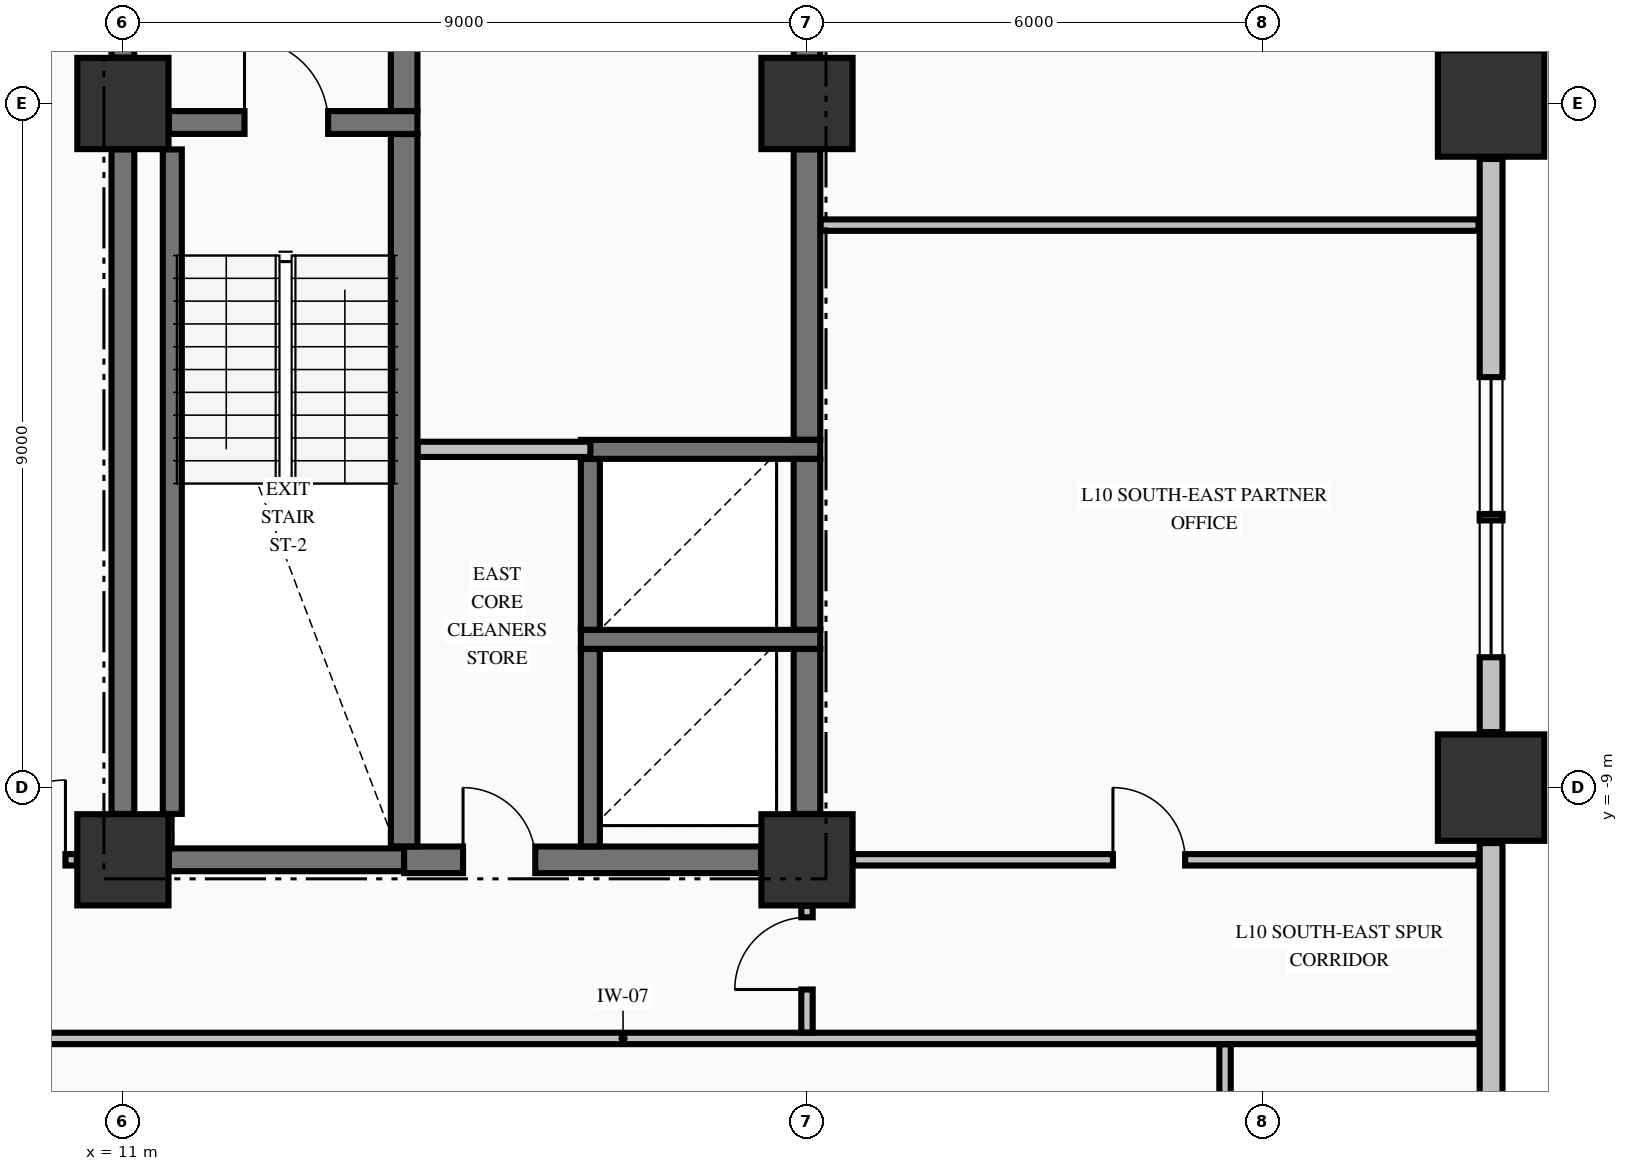
"""IFC4 building model, lengths in metres.
Left out: names, types, materials, properties, quantities, classifications, styles, units other than length and angle.
Written with IfcOpenShell. Run it as: python <this file> out.ifc"""

import sys

from ifc_helpers import new_model, si_unit, direction, frame, frame_2d, origin, origin_2d, place, context, subcontext, project, spatial, rectangle, extrude, element, fill, save


model = new_model("IFC4")
c1 = context("Model", 3, precision=1e-05, world=origin(), true_north=direction((0.0, 1.0)))
c2 = subcontext(c1, "Body", "Model", "MODEL_VIEW")
j1 = project(units=[si_unit("LENGTHUNIT", "METRE"), si_unit("PLANEANGLEUNIT", "RADIAN")], contexts=[c1])
p1 = place(None, origin())
s1 = spatial("IfcSite", under=j1, at=p1, CompositionType="ELEMENT")
p2 = place(p1, origin())
s2 = spatial("IfcBuilding", under=s1, at=p2, CompositionType="ELEMENT")
p3 = place(p2, frame((0.0, 0.0, 45.05)))
s3 = spatial("IfcBuildingStorey", under=s2, at=p3, CompositionType="ELEMENT", Elevation=45.05)
for number, where, z_axis, x_axis in (
    (1, (29.0, -9.0, -0.25), (0.0, 0.0, 1.0), (1.0, 0.0, 0.0)),
    (2, (29.0, 0.0, -0.25), (0.0, 0.0, 1.0), (1.0, 0.0, 0.0)),
):
    element("IfcColumn", number, at=place(p3, frame(where, z_axis=z_axis, x_axis=x_axis)), inside=s3, PredefinedType="COLUMN", context=c2, shape_type="SweptSolid", body=[
        extrude(rectangle(XDim=1.4, YDim=1.4, at=origin_2d()), origin(), (0.0, 0.0, 1.0), 3.57),
    ])
for number, where, z_axis, x_axis in (
    (3, (11.0, -9.95, -0.25), (0.0, 0.0, 1.0), (1.0, 0.0, 0.0)),
    (4, (11.0, 0.0, -0.25), (0.0, 0.0, 1.0), (1.0, 0.0, 0.0)),
    (5, (20.0, -9.95, -0.25), (0.0, 0.0, 1.0), (1.0, 0.0, 0.0)),
    (6, (20.0, 0.0, -0.25), (0.0, 0.0, 1.0), (1.0, 0.0, 0.0)),
):
    element("IfcColumn", number, at=place(p3, frame(where, z_axis=z_axis, x_axis=x_axis)), inside=s3, PredefinedType="COLUMN", context=c2, shape_type="SweptSolid", body=[
        extrude(rectangle(XDim=1.2, YDim=1.2, at=origin_2d()), origin(), (0.0, 0.0, 1.0), 3.57),
    ])
p4 = place(p3, frame((29.0, -22.27, 0.0), z_axis=(0.0, 0.0, 1.0), x_axis=(0.0, 1.0, 0.0)))
e7 = element("IfcWall", 7, at=p4, inside=s3, PredefinedType="STANDARD", context=c2, shape_type="SweptSolid", body=[
    extrude(rectangle(XDim=12.54, YDim=0.3, at=frame_2d((6.27, 0.0))), origin(), (0.0, 0.0, 1.0), 2.712),
])
p5 = place(p3, frame((29.0, -8.27, 0.0), z_axis=(0.0, 0.0, 1.0), x_axis=(0.0, 1.0, 0.0)))
e8 = element("IfcWall", 8, at=p5, inside=s3, PredefinedType="STANDARD", context=c2, shape_type="SweptSolid", body=[
    extrude(rectangle(XDim=7.54, YDim=0.3, at=frame_2d((3.77, 0.0))), origin(), (0.0, 0.0, 1.0), 2.712),
])
p6 = place(p5, frame((0.985, 0.0, 0.78)))
e9 = element("IfcOpeningElement", 9, at=p6, cuts=e8, PredefinedType="OPENING", context=c2, shape_type="SweptSolid", body=[
    extrude(rectangle(XDim=1.8, YDim=1.72, at=frame_2d((0.9, 0.86))), frame((0.0, 0.16, 0.0), z_axis=(0.0, -1.0, 0.0), x_axis=(1.0, 0.0, 0.0)), (0.0, 0.0, 1.0), 0.32),
])
p7 = place(p5, frame((2.87, 0.0, 0.78)))
e10 = element("IfcOpeningElement", 10, at=p7, cuts=e8, PredefinedType="OPENING", context=c2, shape_type="SweptSolid", body=[
    extrude(rectangle(XDim=1.8, YDim=1.72, at=frame_2d((0.9, 0.86))), frame((0.0, 0.16, 0.0), z_axis=(0.0, -1.0, 0.0), x_axis=(1.0, 0.0, 0.0)), (0.0, 0.0, 1.0), 0.32),
])
p8 = place(p3, frame((11.604, -9.95, 0.0), z_axis=(0.0, 0.0, 1.0), x_axis=(1.0, 0.0, 0.0)))
e11 = element("IfcWall", 11, at=p8, inside=s3, PredefinedType="SHEAR", context=c2, shape_type="SweptSolid", body=[
    extrude(rectangle(XDim=3.096, YDim=0.3, at=frame_2d((1.548, 0.0))), origin(), (0.0, 0.0, 1.0), 3.32),
])
p9 = place(p3, frame((14.7, -9.95, 0.0), z_axis=(0.0, 0.0, 1.0), x_axis=(1.0, 0.0, 0.0)))
e12 = element("IfcWall", 12, at=p9, inside=s3, PredefinedType="SHEAR", context=c2, shape_type="SweptSolid", body=[
    extrude(rectangle(XDim=4.696, YDim=0.35, at=frame_2d((2.348, 0.0))), origin(), (0.0, 0.0, 1.0), 3.32),
])
p10 = place(p9, frame((0.775, 0.0, 0.0)))
e13 = element("IfcOpeningElement", 13, at=p10, cuts=e12, PredefinedType="OPENING", context=c2, shape_type="SweptSolid", body=[
    extrude(rectangle(XDim=0.95, YDim=2.15, at=frame_2d((0.475, 1.075))), frame((0.0, 0.185, 0.0), z_axis=(0.0, -1.0, 0.0), x_axis=(1.0, 0.0, 0.0)), (0.0, 0.0, 1.0), 0.37),
])
for number, where, z_axis, x_axis in (
    (14, (17.025, -7.05, 0.0), (0.0, 0.0, 1.0), (1.0, 0.0, 0.0)),
    (15, (17.025, -4.55, 0.0), (0.0, 0.0, 1.0), (1.0, 0.0, 0.0)),
):
    element("IfcWall", number, at=place(p3, frame(where, z_axis=z_axis, x_axis=x_axis)), inside=s3, PredefinedType="SOLIDWALL", context=c2, shape_type="SweptSolid", body=[
        extrude(rectangle(XDim=3.15, YDim=0.25, at=frame_2d((1.575, 0.0))), origin(), (0.0, 0.0, 1.0), 3.32),
    ])
p11 = place(p3, frame((11.604, -0.25, 0.0), z_axis=(0.0, 0.0, 1.0), x_axis=(1.0, 0.0, 0.0)))
e16 = element("IfcWall", 16, at=p11, inside=s3, PredefinedType="SHEAR", context=c2, shape_type="SweptSolid", body=[
    extrude(rectangle(XDim=3.271, YDim=0.3, at=frame_2d((1.635, 0.0))), origin(), (0.0, 0.0, 1.0), 3.32),
])
p12 = place(p11, frame((0.996, 0.0, 0.0)))
e17 = element("IfcOpeningElement", 17, at=p12, cuts=e16, PredefinedType="OPENING", context=c2, shape_type="SweptSolid", body=[
    extrude(rectangle(XDim=1.1, YDim=2.15, at=frame_2d((0.55, 1.075))), frame((0.0, 0.16, 0.0), z_axis=(0.0, -1.0, 0.0), x_axis=(1.0, 0.0, 0.0)), (0.0, 0.0, 1.0), 0.32),
])
p13 = place(p3, frame((-23.835, -12.3, 0.0), z_axis=(0.0, 0.0, 1.0), x_axis=(1.0, 0.0, 0.0)))
e18 = element("IfcWall", 18, at=p13, inside=s3, PredefinedType="PARTITIONING", context=c2, shape_type="SweptSolid", body=[
    extrude(rectangle(XDim=52.67, YDim=0.15, at=frame_2d((26.335, 0.0))), origin(), (0.0, 0.0, 1.0), 3.32),
])
p14 = place(p13, frame((8.99, 0.0, 0.0)))
e19 = element("IfcOpeningElement", 19, at=p14, cuts=e18, PredefinedType="OPENING", context=c2, shape_type="SweptSolid", body=[
    extrude(rectangle(XDim=1.05, YDim=2.15, at=frame_2d((0.525, 1.075))), frame((0.0, 0.085, 0.0), z_axis=(0.0, -1.0, 0.0), x_axis=(1.0, 0.0, 0.0)), (0.0, 0.0, 1.0), 0.17),
])
p15 = place(p13, frame((20.96, 0.0, 0.0)))
e20 = element("IfcOpeningElement", 20, at=p15, cuts=e18, PredefinedType="OPENING", context=c2, shape_type="SweptSolid", body=[
    extrude(rectangle(XDim=1.05, YDim=2.15, at=frame_2d((0.525, 1.075))), frame((0.0, 0.085, 0.0), z_axis=(0.0, -1.0, 0.0), x_axis=(1.0, 0.0, 0.0)), (0.0, 0.0, 1.0), 0.17),
])
p16 = place(p13, frame((29.11, 0.0, 0.0)))
e21 = element("IfcOpeningElement", 21, at=p16, cuts=e18, PredefinedType="OPENING", context=c2, shape_type="SweptSolid", body=[
    extrude(rectangle(XDim=1.05, YDim=2.15, at=frame_2d((0.525, 1.075))), frame((0.0, 0.085, 0.0), z_axis=(0.0, -1.0, 0.0), x_axis=(1.0, 0.0, 0.0)), (0.0, 0.0, 1.0), 0.17),
])
p17 = place(p3, frame((-10.394, -9.95, 0.0), z_axis=(0.0, 0.0, 1.0), x_axis=(1.0, 0.0, 0.0)))
e22 = element("IfcWall", 22, at=p17, inside=s3, PredefinedType="PARTITIONING", context=c2, shape_type="SweptSolid", body=[
    extrude(rectangle(XDim=20.788, YDim=0.15, at=frame_2d((10.394, 0.0))), origin(), (0.0, 0.0, 1.0), 3.32),
])
p18 = place(p17, frame((0.15, 0.0, 0.0)))
e23 = element("IfcOpeningElement", 23, at=p18, cuts=e22, PredefinedType="OPENING", context=c2, shape_type="SweptSolid", body=[
    extrude(rectangle(XDim=1.05, YDim=2.15, at=frame_2d((0.525, 1.075))), frame((0.0, 0.085, 0.0), z_axis=(0.0, -1.0, 0.0), x_axis=(1.0, 0.0, 0.0)), (0.0, 0.0, 1.0), 0.17),
])
p19 = place(p17, frame((19.588, 0.0, 0.0)))
e24 = element("IfcOpeningElement", 24, at=p19, cuts=e22, PredefinedType="OPENING", context=c2, shape_type="SweptSolid", body=[
    extrude(rectangle(XDim=1.05, YDim=2.15, at=frame_2d((0.525, 1.075))), frame((0.0, 0.085, 0.0), z_axis=(0.0, -1.0, 0.0), x_axis=(1.0, 0.0, 0.0)), (0.0, 0.0, 1.0), 0.17),
])
p20 = place(p17, frame((12.669, 0.0, 0.0)))
e25 = element("IfcOpeningElement", 25, at=p20, cuts=e22, PredefinedType="OPENING", context=c2, shape_type="SweptSolid", body=[
    extrude(rectangle(XDim=0.95, YDim=2.15, at=frame_2d((0.475, 1.075))), frame((0.0, 0.085, 0.0), z_axis=(0.0, -1.0, 0.0), x_axis=(1.0, 0.0, 0.0)), (0.0, 0.0, 1.0), 0.17),
])
p21 = place(p3, frame((20.606, -9.95, 0.0), z_axis=(0.0, 0.0, 1.0), x_axis=(1.0, 0.0, 0.0)))
e26 = element("IfcWall", 26, at=p21, inside=s3, PredefinedType="PARTITIONING", context=c2, shape_type="SweptSolid", body=[
    extrude(rectangle(XDim=8.229, YDim=0.15, at=frame_2d((4.115, 0.0))), origin(), (0.0, 0.0, 1.0), 3.32),
])
p22 = place(p21, frame((3.419, 0.0, 0.0)))
e27 = element("IfcOpeningElement", 27, at=p22, cuts=e26, PredefinedType="OPENING", context=c2, shape_type="SweptSolid", body=[
    extrude(rectangle(XDim=0.95, YDim=2.15, at=frame_2d((0.475, 1.075))), frame((0.0, 0.085, 0.0), z_axis=(0.0, -1.0, 0.0), x_axis=(1.0, 0.0, 0.0)), (0.0, 0.0, 1.0), 0.17),
])
p23 = place(p3, frame((14.878, -4.55, 0.0), z_axis=(0.0, 0.0, 1.0), x_axis=(1.0, 0.0, 0.0)))
e28 = element("IfcWall", 28, at=p23, inside=s3, PredefinedType="PARTITIONING", context=c2, shape_type="SweptSolid", body=[
    extrude(rectangle(XDim=2.272, YDim=0.2, at=frame_2d((1.136, 0.0))), origin(), (0.0, 0.0, 1.0), 3.32),
])
p24 = place(p3, frame((20.178, -1.6, 0.0), z_axis=(0.0, 0.0, 1.0), x_axis=(1.0, 0.0, 0.0)))
e29 = element("IfcWall", 29, at=p24, inside=s3, PredefinedType="PARTITIONING", context=c2, shape_type="SweptSolid", body=[
    extrude(rectangle(XDim=8.657, YDim=0.15, at=frame_2d((4.329, 0.0))), origin(), (0.0, 0.0, 1.0), 3.32),
])
p25 = place(p3, frame((11.0, -9.346, 0.0), z_axis=(0.0, 0.0, 1.0), x_axis=(0.0, 1.0, 0.0)))
e30 = element("IfcWall", 30, at=p25, inside=s3, PredefinedType="SHEAR", context=c2, shape_type="SweptSolid", body=[
    extrude(rectangle(XDim=8.742, YDim=0.3, at=frame_2d((4.371, 0.0))), origin(), (0.0, 0.0, 1.0), 3.32),
])
p26 = place(p3, frame((11.0, 0.604, 0.0), z_axis=(0.0, 0.0, 1.0), x_axis=(0.0, 1.0, 0.0)))
e31 = element("IfcWall", 31, at=p26, inside=s3, PredefinedType="SHEAR", context=c2, shape_type="SweptSolid", body=[
    extrude(rectangle(XDim=2.144, YDim=0.3, at=frame_2d((1.072, 0.0))), origin(), (0.0, 0.0, 1.0), 3.32),
])
p27 = place(p26, frame((0.496, 0.0, 0.0)))
e32 = element("IfcOpeningElement", 32, at=p27, cuts=e31, PredefinedType="OPENING", context=c2, shape_type="SweptSolid", body=[
    extrude(rectangle(XDim=1.1, YDim=2.15, at=frame_2d((0.55, 1.075))), frame((0.0, 0.16, 0.0), z_axis=(0.0, -1.0, 0.0), x_axis=(1.0, 0.0, 0.0)), (0.0, 0.0, 1.0), 0.32),
])
p28 = place(p3, frame((11.65, -9.346, 0.0), z_axis=(0.0, 0.0, 1.0), x_axis=(0.0, 1.0, 0.0)))
e33 = element("IfcWall", 33, at=p28, inside=s3, PredefinedType="SOLIDWALL", context=c2, shape_type="SweptSolid", body=[
    extrude(rectangle(XDim=8.742, YDim=0.25, at=frame_2d((4.371, 0.0))), origin(), (0.0, 0.0, 1.0), 3.32),
])
p29 = place(p3, frame((14.7, -9.773, 0.0), z_axis=(0.0, 0.0, 1.0), x_axis=(0.0, 1.0, 0.0)))
e34 = element("IfcWall", 34, at=p29, inside=s3, PredefinedType="SHEAR", context=c2, shape_type="SweptSolid", body=[
    extrude(rectangle(XDim=9.371, YDim=0.35, at=frame_2d((4.686, 0.0))), origin(), (0.0, 0.0, 1.0), 3.32),
])
p30 = place(p3, frame((14.7, -0.098, 0.0), z_axis=(0.0, 0.0, 1.0), x_axis=(0.0, 1.0, 0.0)))
e35 = element("IfcWall", 35, at=p30, inside=s3, PredefinedType="SHEAR", context=c2, shape_type="SweptSolid", body=[
    extrude(rectangle(XDim=2.846, YDim=0.35, at=frame_2d((1.423, 0.0))), origin(), (0.0, 0.0, 1.0), 3.32),
])
p31 = place(p3, frame((17.15, -9.773, 0.0), z_axis=(0.0, 0.0, 1.0), x_axis=(0.0, 1.0, 0.0)))
e36 = element("IfcWall", 36, at=p31, inside=s3, PredefinedType="SOLIDWALL", context=c2, shape_type="SweptSolid", body=[
    extrude(rectangle(XDim=2.596, YDim=0.25, at=frame_2d((1.298, 0.0))), origin(), (0.0, 0.0, 1.0), 3.32),
])
p32 = place(p3, frame((17.15, -6.923, 0.0), z_axis=(0.0, 0.0, 1.0), x_axis=(0.0, 1.0, 0.0)))
e37 = element("IfcWall", 37, at=p32, inside=s3, PredefinedType="SOLIDWALL", context=c2, shape_type="SweptSolid", body=[
    extrude(rectangle(XDim=2.246, YDim=0.25, at=frame_2d((1.123, 0.0))), origin(), (0.0, 0.0, 1.0), 3.32),
])
p33 = place(p3, frame((20.0, -9.346, 0.0), z_axis=(0.0, 0.0, 1.0), x_axis=(0.0, 1.0, 0.0)))
e38 = element("IfcWall", 38, at=p33, inside=s3, PredefinedType="SHEAR", context=c2, shape_type="SweptSolid", body=[
    extrude(rectangle(XDim=2.169, YDim=0.35, at=frame_2d((1.084, 0.0))), origin(), (0.0, 0.0, 1.0), 3.32),
])
p34 = place(p3, frame((20.0, -6.923, 0.0), z_axis=(0.0, 0.0, 1.0), x_axis=(0.0, 1.0, 0.0)))
e39 = element("IfcWall", 39, at=p34, inside=s3, PredefinedType="SHEAR", context=c2, shape_type="SweptSolid", body=[
    extrude(rectangle(XDim=2.246, YDim=0.35, at=frame_2d((1.123, 0.0))), origin(), (0.0, 0.0, 1.0), 3.32),
])
p35 = place(p3, frame((20.0, -4.423, 0.0), z_axis=(0.0, 0.0, 1.0), x_axis=(0.0, 1.0, 0.0)))
e40 = element("IfcWall", 40, at=p35, inside=s3, PredefinedType="SHEAR", context=c2, shape_type="SweptSolid", body=[
    extrude(rectangle(XDim=3.819, YDim=0.35, at=frame_2d((1.91, 0.0))), origin(), (0.0, 0.0, 1.0), 3.32),
])
p36 = place(p3, frame((20.0, 0.604, 0.0), z_axis=(0.0, 0.0, 1.0), x_axis=(0.0, 1.0, 0.0)))
e41 = element("IfcWall", 41, at=p36, inside=s3, PredefinedType="SHEAR", context=c2, shape_type="SweptSolid", body=[
    extrude(rectangle(XDim=9.292, YDim=0.35, at=frame_2d((4.646, 0.0))), origin(), (0.0, 0.0, 1.0), 3.32),
])
p37 = place(p3, frame((20.0, -12.222, 0.0), z_axis=(0.0, 0.0, 1.0), x_axis=(0.0, 1.0, 0.0)))
e42 = element("IfcWall", 42, at=p37, inside=s3, PredefinedType="PARTITIONING", context=c2, shape_type="SweptSolid", body=[
    extrude(rectangle(XDim=1.666, YDim=0.15, at=frame_2d((0.833, 0.0))), origin(), (0.0, 0.0, 1.0), 2.66),
])
p38 = place(p37, frame((0.566, 0.0, 0.0)))
e43 = element("IfcOpeningElement", 43, at=p38, cuts=e42, PredefinedType="OPENING", context=c2, shape_type="SweptSolid", body=[
    extrude(rectangle(XDim=0.95, YDim=2.15, at=frame_2d((0.475, 1.075))), frame((0.0, 0.085, 0.0), z_axis=(0.0, -1.0, 0.0), x_axis=(1.0, 0.0, 0.0)), (0.0, 0.0, 1.0), 0.17),
])
p39 = place(p3, frame((25.5, -22.294, 0.0), z_axis=(0.0, 0.0, 1.0), x_axis=(0.0, 1.0, 0.0)))
e44 = element("IfcWall", 44, at=p39, inside=s3, PredefinedType="PARTITIONING", context=c2, shape_type="SweptSolid", body=[
    extrude(rectangle(XDim=9.916, YDim=0.15, at=frame_2d((4.958, 0.0))), origin(), (0.0, 0.0, 1.0), 3.32),
])
p40 = place(p6, origin())
e45 = element("IfcWindow", 45, at=p40, inside=s3, PartitioningType="SINGLE_PANEL", PredefinedType="WINDOW", context=c2, shape_type="SweptSolid", body=[
    extrude(rectangle(XDim=1.8, YDim=1.72, at=frame_2d((0.9, 0.86))), frame((0.0, 0.03, 0.0), z_axis=(0.0, -1.0, 0.0), x_axis=(1.0, 0.0, 0.0)), (0.0, 0.0, 1.0), 0.06),
])
fill(e9, e45)
p41 = place(p7, origin())
e46 = element("IfcWindow", 46, at=p41, inside=s3, PartitioningType="SINGLE_PANEL", PredefinedType="WINDOW", context=c2, shape_type="SweptSolid", body=[
    extrude(rectangle(XDim=1.8, YDim=1.72, at=frame_2d((0.9, 0.86))), frame((0.0, 0.03, 0.0), z_axis=(0.0, -1.0, 0.0), x_axis=(1.0, 0.0, 0.0)), (0.0, 0.0, 1.0), 0.06),
])
fill(e10, e46)
p42 = place(p12, origin())
e47 = element("IfcDoor", 47, at=p42, inside=s3, OperationType="SINGLE_SWING_LEFT", PredefinedType="DOOR", context=c2, shape_type="SweptSolid", body=[
    extrude(rectangle(XDim=1.1, YDim=2.15, at=frame_2d((0.55, 1.075))), frame((0.0, 0.025, 0.0), z_axis=(0.0, -1.0, 0.0), x_axis=(1.0, 0.0, 0.0)), (0.0, 0.0, 1.0), 0.05),
])
fill(e17, e47)
p43 = place(p10, origin())
e48 = element("IfcDoor", 48, at=p43, inside=s3, OperationType="SINGLE_SWING_LEFT", PredefinedType="DOOR", context=c2, shape_type="SweptSolid", body=[
    extrude(rectangle(XDim=0.95, YDim=2.15, at=frame_2d((0.475, 1.075))), frame((0.0, 0.025, 0.0), z_axis=(0.0, -1.0, 0.0), x_axis=(1.0, 0.0, 0.0)), (0.0, 0.0, 1.0), 0.05),
])
fill(e13, e48)
p44 = place(p19, origin())
e49 = element("IfcDoor", 49, at=p44, inside=s3, OperationType="SINGLE_SWING_RIGHT", PredefinedType="DOOR", context=c2, shape_type="SweptSolid", body=[
    extrude(rectangle(XDim=1.05, YDim=2.15, at=frame_2d((0.525, 1.075))), frame((0.0, 0.025, 0.0), z_axis=(0.0, -1.0, 0.0), x_axis=(1.0, 0.0, 0.0)), (0.0, 0.0, 1.0), 0.05),
])
fill(e24, e49)
p45 = place(p38, origin())
e50 = element("IfcDoor", 50, at=p45, inside=s3, OperationType="SINGLE_SWING_LEFT", PredefinedType="DOOR", context=c2, shape_type="SweptSolid", body=[
    extrude(rectangle(XDim=0.95, YDim=2.15, at=frame_2d((0.475, 1.075))), frame((0.0, 0.025, 0.0), z_axis=(0.0, -1.0, 0.0), x_axis=(1.0, 0.0, 0.0)), (0.0, 0.0, 1.0), 0.05),
])
fill(e43, e50)
p46 = place(p22, origin())
e51 = element("IfcDoor", 51, at=p46, inside=s3, OperationType="SINGLE_SWING_LEFT", PredefinedType="DOOR", context=c2, shape_type="SweptSolid", body=[
    extrude(rectangle(XDim=0.95, YDim=2.15, at=frame_2d((0.475, 1.075))), frame((0.0, 0.025, 0.0), z_axis=(0.0, -1.0, 0.0), x_axis=(1.0, 0.0, 0.0)), (0.0, 0.0, 1.0), 0.05),
])
fill(e27, e51)
save(model, sys.argv[1])
